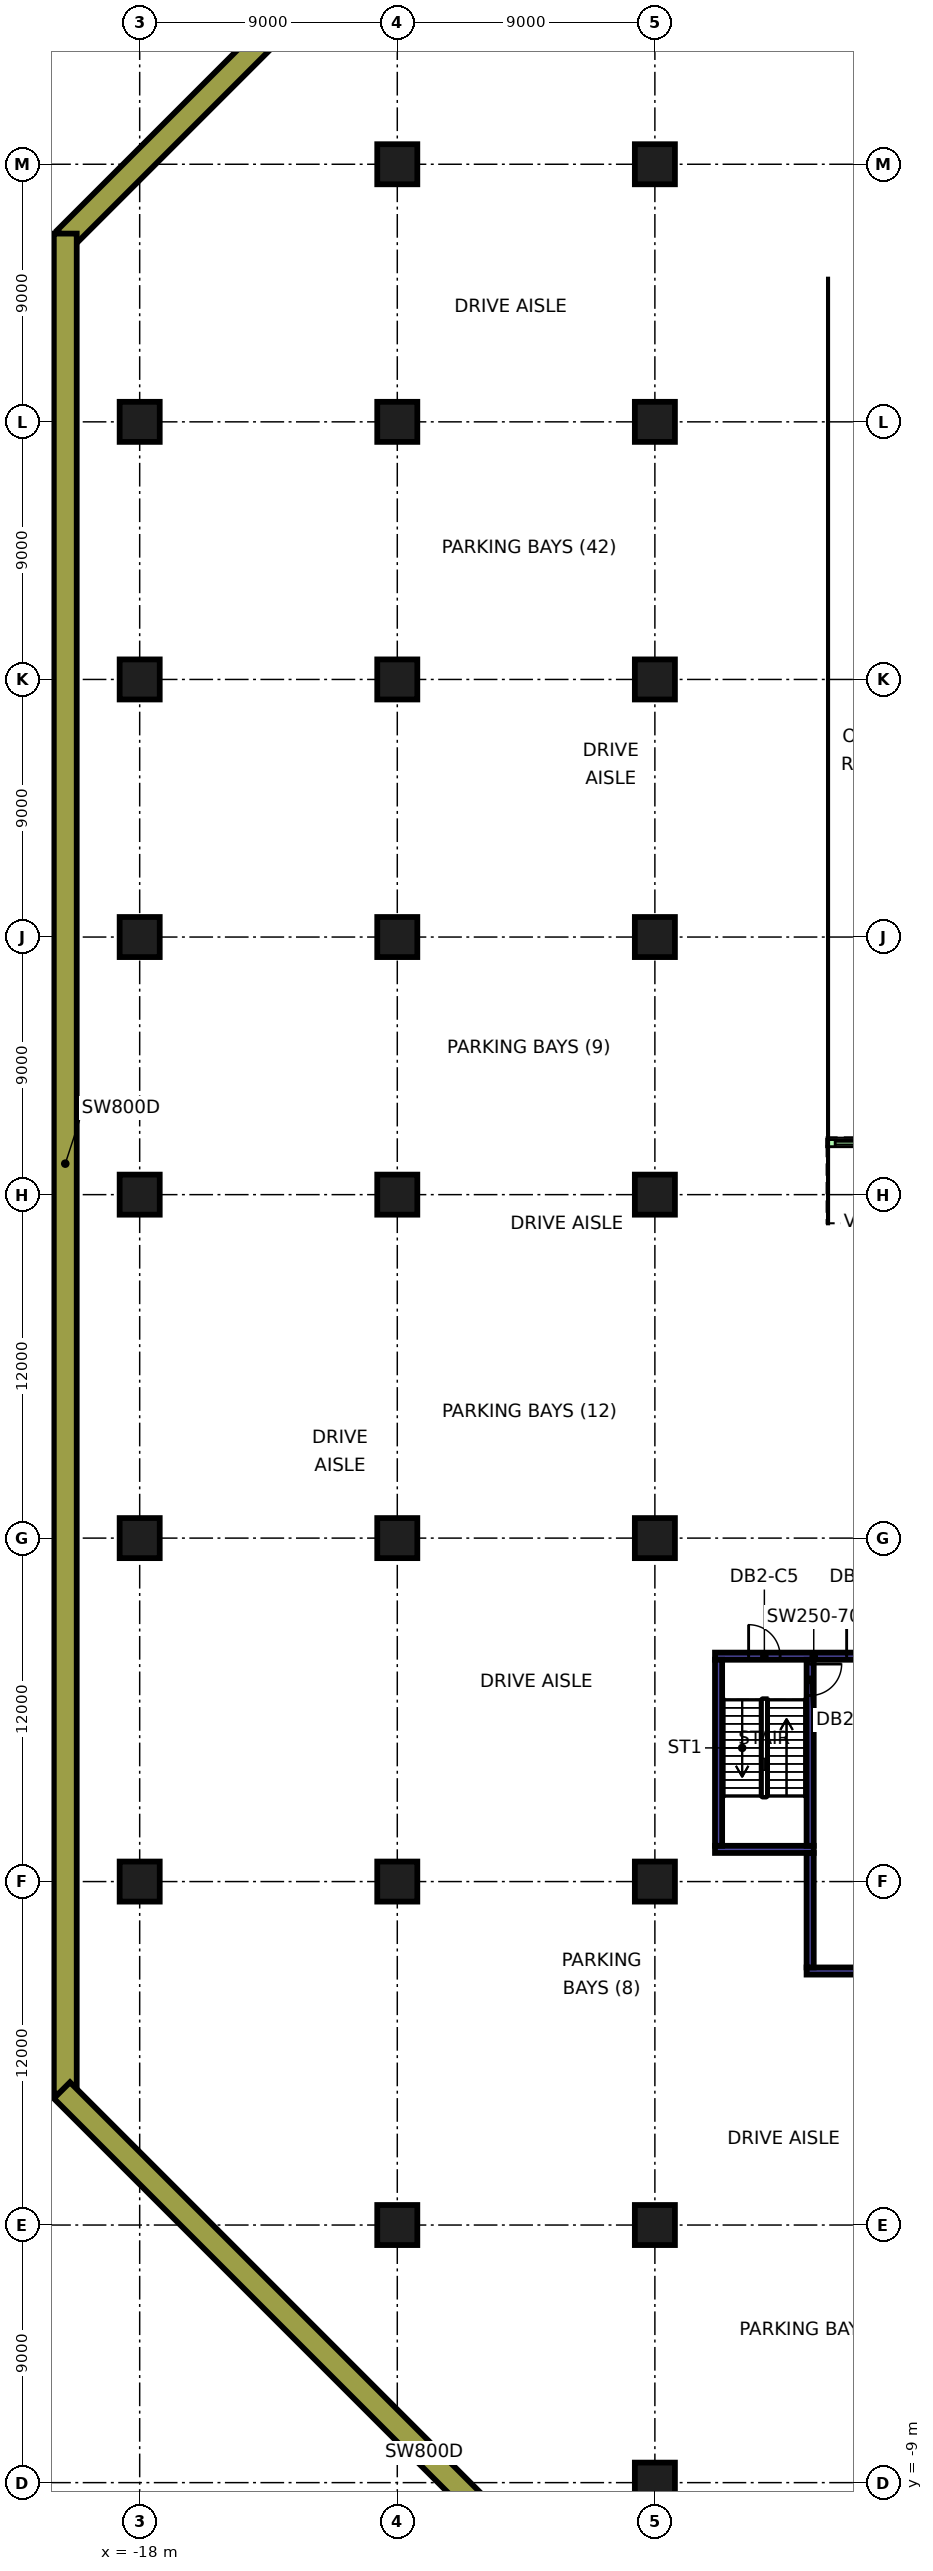
"""IFC4 building model, lengths in metres.
Left out: names, types, materials, properties, quantities, classifications, styles, units other than length and angle.
Written with IfcOpenShell. Run it as: python <this file> out.ifc"""

import sys

from ifc_helpers import new_model, si_unit, direction, frame, frame_2d, origin, origin_2d, place, context, subcontext, project, spatial, rectangle, extrude, element, fill, save


model = new_model("IFC4")
c1 = context("Model", 3, precision=1e-05, world=origin(), true_north=direction((0.0, 1.0)))
c2 = subcontext(c1, "Body", "Model", "MODEL_VIEW")
j1 = project(units=[si_unit("LENGTHUNIT", "METRE"), si_unit("PLANEANGLEUNIT", "RADIAN")], contexts=[c1])
p1 = place(None, origin())
s1 = spatial("IfcSite", under=j1, at=p1, CompositionType="ELEMENT")
p2 = place(p1, origin())
s2 = spatial("IfcBuilding", under=s1, at=p2, CompositionType="ELEMENT")
p3 = place(p2, frame((0.0, 0.0, -9.0)))
s3 = spatial("IfcBuildingStorey", under=s2, at=p3, CompositionType="ELEMENT", Elevation=-9.0)
for number, where, z_axis, x_axis in (
    (1, (-18.0, 12.0, 0.0), (0.0, 0.0, 1.0), (1.0, 0.0, 0.0)),
    (2, (-18.0, 24.0, 0.0), (0.0, 0.0, 1.0), (1.0, 0.0, 0.0)),
    (3, (-18.0, 36.0, 0.0), (0.0, 0.0, 1.0), (1.0, 0.0, 0.0)),
    (4, (-18.0, 45.0, 0.0), (0.0, 0.0, 1.0), (1.0, 0.0, 0.0)),
    (5, (-18.0, 54.0, 0.0), (0.0, 0.0, 1.0), (1.0, 0.0, 0.0)),
    (6, (-18.0, 63.0, 0.0), (0.0, 0.0, 1.0), (1.0, 0.0, 0.0)),
    (7, (-9.0, 0.0, 0.0), (0.0, 0.0, 1.0), (1.0, 0.0, 0.0)),
    (8, (-9.0, 12.0, 0.0), (0.0, 0.0, 1.0), (1.0, 0.0, 0.0)),
    (9, (-9.0, 24.0, 0.0), (0.0, 0.0, 1.0), (1.0, 0.0, 0.0)),
    (10, (-9.0, 36.0, 0.0), (0.0, 0.0, 1.0), (1.0, 0.0, 0.0)),
    (11, (-9.0, 45.0, 0.0), (0.0, 0.0, 1.0), (1.0, 0.0, 0.0)),
    (12, (-9.0, 54.0, 0.0), (0.0, 0.0, 1.0), (1.0, 0.0, 0.0)),
    (13, (-9.0, 63.0, 0.0), (0.0, 0.0, 1.0), (1.0, 0.0, 0.0)),
    (14, (-9.0, 72.0, 0.0), (0.0, 0.0, 1.0), (1.0, 0.0, 0.0)),
    (15, (0.0, -9.0, 0.0), (0.0, 0.0, 1.0), (1.0, 0.0, 0.0)),
    (16, (0.0, 0.0, 0.0), (0.0, 0.0, 1.0), (1.0, 0.0, 0.0)),
    (17, (0.0, 12.0, 0.0), (0.0, 0.0, 1.0), (1.0, 0.0, 0.0)),
    (18, (0.0, 24.0, 0.0), (0.0, 0.0, 1.0), (1.0, 0.0, 0.0)),
    (19, (0.0, 36.0, 0.0), (0.0, 0.0, 1.0), (1.0, 0.0, 0.0)),
    (20, (0.0, 45.0, 0.0), (0.0, 0.0, 1.0), (1.0, 0.0, 0.0)),
    (21, (0.0, 54.0, 0.0), (0.0, 0.0, 1.0), (1.0, 0.0, 0.0)),
    (22, (0.0, 63.0, 0.0), (0.0, 0.0, 1.0), (1.0, 0.0, 0.0)),
    (23, (0.0, 72.0, 0.0), (0.0, 0.0, 1.0), (1.0, 0.0, 0.0)),
):
    element("IfcColumn", number, at=place(p3, frame(where, z_axis=z_axis, x_axis=x_axis)), inside=s3, PredefinedType="COLUMN", context=c2, shape_type="SweptSolid", body=[
        extrude(rectangle(XDim=1.4, YDim=1.4, at=origin_2d()), origin(), (0.0, 0.0, 1.0), 4.5),
    ])
p4 = place(p3, frame((2.1, 19.875, 0.0), z_axis=(0.0, 0.0, 1.0), x_axis=(1.0, 0.0, 0.0)))
e24 = element("IfcWall", 24, at=p4, inside=s3, PredefinedType="SHEAR", context=c2, shape_type="SweptSolid", body=[
    extrude(rectangle(XDim=6.9, YDim=0.25, at=frame_2d((3.45, 0.0))), origin(), (0.0, 0.0, 1.0), 4.5),
])
p5 = place(p4, frame((1.175, 0.0, 0.0)))
e25 = element("IfcOpeningElement", 25, at=p5, cuts=e24, PredefinedType="OPENING", context=c2, shape_type="SweptSolid", body=[
    extrude(rectangle(XDim=1.1, YDim=2.2, at=frame_2d((0.55, 1.1))), frame((0.0, 0.135, 0.0), z_axis=(0.0, -1.0, 0.0), x_axis=(1.0, 0.0, 0.0)), (0.0, 0.0, 1.0), 0.27),
])
p6 = place(p4, frame((4.6, 0.0, 0.0)))
e26 = element("IfcOpeningElement", 26, at=p6, cuts=e24, PredefinedType="OPENING", context=c2, shape_type="SweptSolid", body=[
    extrude(rectangle(XDim=1.2, YDim=2.2, at=frame_2d((0.6, 1.1))), frame((0.0, 0.135, 0.0), z_axis=(0.0, -1.0, 0.0), x_axis=(1.0, 0.0, 0.0)), (0.0, 0.0, 1.0), 0.27),
])
p7 = place(p3, frame((2.1, 13.125, 0.0), z_axis=(0.0, 0.0, 1.0), x_axis=(1.0, 0.0, 0.0)))
e27 = element("IfcWall", 27, at=p7, inside=s3, PredefinedType="SHEAR", context=c2, shape_type="SweptSolid", body=[
    extrude(rectangle(XDim=3.45, YDim=0.25, at=frame_2d((1.725, 0.0))), origin(), (0.0, 0.0, 1.0), 4.5),
])
p8 = place(p3, frame((2.225, 13.25, 0.0), z_axis=(0.0, 0.0, 1.0), x_axis=(0.0, 1.0, 0.0)))
e28 = element("IfcWall", 28, at=p8, inside=s3, PredefinedType="SHEAR", context=c2, shape_type="SweptSolid", body=[
    extrude(rectangle(XDim=6.5, YDim=0.25, at=frame_2d((3.25, 0.0))), origin(), (0.0, 0.0, 1.0), 4.5),
])
p9 = place(p3, frame((5.425, 13.25, 0.0), z_axis=(0.0, 0.0, 1.0), x_axis=(0.0, 1.0, 0.0)))
e29 = element("IfcWall", 29, at=p9, inside=s3, PredefinedType="SHEAR", context=c2, shape_type="SweptSolid", body=[
    extrude(rectangle(XDim=6.5, YDim=0.25, at=frame_2d((3.25, 0.0))), origin(), (0.0, 0.0, 1.0), 4.5),
])
p10 = place(p9, frame((5.25, 0.0, 0.0)))
e30 = element("IfcOpeningElement", 30, at=p10, cuts=e29, PredefinedType="OPENING", context=c2, shape_type="SweptSolid", body=[
    extrude(rectangle(XDim=1.1, YDim=2.2, at=frame_2d((0.55, 1.1))), frame((0.0, 0.135, 0.0), z_axis=(0.0, -1.0, 0.0), x_axis=(1.0, 0.0, 0.0)), (0.0, 0.0, 1.0), 0.27),
])
p11 = place(p3, frame((5.3, 8.875, 0.0), z_axis=(0.0, 0.0, 1.0), x_axis=(1.0, 0.0, 0.0)))
e31 = element("IfcWall", 31, at=p11, inside=s3, PredefinedType="SHEAR", context=c2, shape_type="SweptSolid", body=[
    extrude(rectangle(XDim=3.7, YDim=0.25, at=frame_2d((1.85, 0.0))), origin(), (0.0, 0.0, 1.0), 4.5),
])
p12 = place(p3, frame((5.425, 9.0, 0.0), z_axis=(0.0, 0.0, 1.0), x_axis=(0.0, 1.0, 0.0)))
e32 = element("IfcWall", 32, at=p12, inside=s3, PredefinedType="SHEAR", context=c2, shape_type="SweptSolid", body=[
    extrude(rectangle(XDim=4.0, YDim=0.25, at=frame_2d((2.0, 0.0))), origin(), (0.0, 0.0, 1.0), 4.5),
])
p13 = place(p3, frame((-6.294, 83.717, 0.0), z_axis=(0.0, 0.0, 1.0), x_axis=(-0.707112814855, -0.707100747466, 0.0)))
e33 = element("IfcWall", 33, at=p13, inside=s3, PredefinedType="SOLIDWALL", context=c2, shape_type="SweptSolid", body=[
    extrude(rectangle(XDim=20.231, YDim=0.8, at=frame_2d((10.116, 0.0))), origin(), (0.0, 0.0, 1.0), 4.5),
])
p14 = place(p3, frame((-20.6, 69.577, 0.0), z_axis=(0.0, 0.0, 1.0), x_axis=(0.0, -1.0, 0.0)))
e34 = element("IfcWall", 34, at=p14, inside=s3, PredefinedType="SOLIDWALL", context=c2, shape_type="SweptSolid", body=[
    extrude(rectangle(XDim=64.989, YDim=0.8, at=frame_2d((32.494, 0.0))), origin(), (0.0, 0.0, 1.0), 4.5),
])
p15 = place(p3, frame((-20.717, 4.706, 0.0), z_axis=(0.0, 0.0, 1.0), x_axis=(0.707103370229, -0.707110192127, 0.0)))
e35 = element("IfcWall", 35, at=p15, inside=s3, PredefinedType="SOLIDWALL", context=c2, shape_type="SweptSolid", body=[
    extrude(rectangle(XDim=35.788, YDim=0.8, at=frame_2d((17.894, 0.0))), origin(), (0.0, 0.0, 1.0), 4.5),
])
p16 = place(p3, frame((6.0, 37.8, -0.233), z_axis=(0.0, 0.0, 1.0), x_axis=(1.0, 0.0, 0.0)))
e36 = element("IfcWall", 36, at=p16, inside=s3, PredefinedType="SOLIDWALL", context=c2, shape_type="SweptSolid", body=[
    extrude(rectangle(XDim=7.5, YDim=0.25, at=frame_2d((3.75, 0.0))), origin(), (0.0, 0.0, 1.0), 2.7),
])
p17 = place(p16, frame((0.3, 0.0, 0.0)))
e37 = element("IfcOpeningElement", 37, at=p17, cuts=e36, PredefinedType="OPENING", context=c2, shape_type="SweptSolid", body=[
    extrude(rectangle(XDim=3.2, YDim=2.4, at=frame_2d((1.6, 1.2))), frame((0.0, 0.135, 0.0), z_axis=(0.0, -1.0, 0.0), x_axis=(1.0, 0.0, 0.0)), (0.0, 0.0, 1.0), 0.27),
])
p18 = place(p16, frame((3.8, 0.0, 0.0)))
e38 = element("IfcOpeningElement", 38, at=p18, cuts=e36, PredefinedType="OPENING", context=c2, shape_type="SweptSolid", body=[
    extrude(rectangle(XDim=3.2, YDim=2.4, at=frame_2d((1.6, 1.2))), frame((0.0, 0.135, 0.0), z_axis=(0.0, -1.0, 0.0), x_axis=(1.0, 0.0, 0.0)), (0.0, 0.0, 1.0), 0.27),
])
p19 = place(p10, origin())
e39 = element("IfcDoor", 39, at=p19, inside=s3, OperationType="SINGLE_SWING_RIGHT", PredefinedType="DOOR", context=c2, shape_type="SweptSolid", body=[
    extrude(rectangle(XDim=1.1, YDim=2.2, at=frame_2d((0.55, 1.1))), frame((0.0, 0.025, 0.0), z_axis=(0.0, -1.0, 0.0), x_axis=(1.0, 0.0, 0.0)), (0.0, 0.0, 1.0), 0.05),
])
fill(e30, e39)
p20 = place(p5, origin())
e40 = element("IfcDoor", 40, at=p20, inside=s3, OperationType="SINGLE_SWING_LEFT", PredefinedType="DOOR", context=c2, shape_type="SweptSolid", body=[
    extrude(rectangle(XDim=1.1, YDim=2.2, at=frame_2d((0.55, 1.1))), frame((0.0, 0.025, 0.0), z_axis=(0.0, -1.0, 0.0), x_axis=(1.0, 0.0, 0.0)), (0.0, 0.0, 1.0), 0.05),
])
fill(e25, e40)
p21 = place(p6, origin())
e41 = element("IfcDoor", 41, at=p21, inside=s3, OperationType="SINGLE_SWING_LEFT", PredefinedType="DOOR", context=c2, shape_type="SweptSolid", body=[
    extrude(rectangle(XDim=1.2, YDim=2.2, at=frame_2d((0.6, 1.1))), frame((0.0, 0.025, 0.0), z_axis=(0.0, -1.0, 0.0), x_axis=(1.0, 0.0, 0.0)), (0.0, 0.0, 1.0), 0.05),
])
fill(e26, e41)
p22 = place(p17, origin())
e42 = element("IfcDoor", 42, at=p22, inside=s3, OperationType="SLIDING_TO_LEFT", PredefinedType="GATE", context=c2, shape_type="SweptSolid", body=[
    extrude(rectangle(XDim=3.2, YDim=2.4, at=frame_2d((1.6, 1.2))), frame((0.0, 0.025, 0.0), z_axis=(0.0, -1.0, 0.0), x_axis=(1.0, 0.0, 0.0)), (0.0, 0.0, 1.0), 0.05),
])
fill(e37, e42)
save(model, sys.argv[1])
